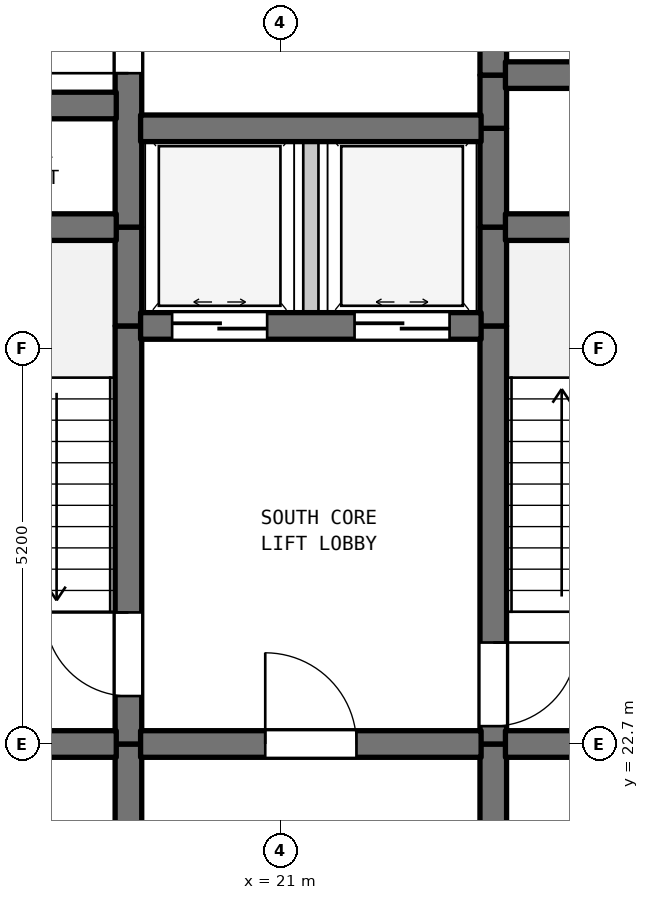
"""IFC4 building model, lengths in metres.
Left out: names, types, materials, properties, quantities, classifications, styles, units other than length and angle.
Written with IfcOpenShell. Run it as: python <this file> out.ifc"""

import sys

from ifc_helpers import new_model, si_unit, direction, frame, frame_2d, origin, place, context, subcontext, project, spatial, rectangle, extrude, element, fill, save


model = new_model("IFC4")
c1 = context("Model", 3, precision=1e-05, world=origin(), true_north=direction((0.0, 1.0)))
c2 = subcontext(c1, "Body", "Model", "MODEL_VIEW")
j1 = project(units=[si_unit("LENGTHUNIT", "METRE"), si_unit("PLANEANGLEUNIT", "RADIAN")], contexts=[c1])
p1 = place(None, origin())
s1 = spatial("IfcSite", under=j1, at=p1, CompositionType="ELEMENT")
p2 = place(p1, origin())
s2 = spatial("IfcBuilding", under=s1, at=p2, CompositionType="ELEMENT")
p3 = place(p2, frame((0.0, 0.0, 86.4)))
s3 = spatial("IfcBuildingStorey", under=s2, at=p3, CompositionType="ELEMENT", Elevation=86.4)
p4 = place(p3, frame((19.0, 19.5, 0.0), z_axis=(0.0, 0.0, 1.0), x_axis=(0.0, 1.0, 0.0)))
e1 = element("IfcWall", 1, at=p4, inside=s3, PredefinedType="SHEAR", context=c2, shape_type="SweptSolid", body=[
    extrude(rectangle(XDim=3.2, YDim=0.35, at=frame_2d((1.6, 0.0))), origin(), (0.0, 0.0, 1.0), 4.185),
])
p5 = place(p3, frame((19.0, 22.7, 0.0), z_axis=(0.0, 0.0, 1.0), x_axis=(0.0, 1.0, 0.0)))
e2 = element("IfcWall", 2, at=p5, inside=s3, PredefinedType="SHEAR", context=c2, shape_type="SweptSolid", body=[
    extrude(rectangle(XDim=5.5, YDim=0.35, at=frame_2d((2.75, 0.0))), origin(), (0.0, 0.0, 1.0), 4.185),
])
p6 = place(p5, frame((0.631, 0.0, 0.0)))
e3 = element("IfcOpeningElement", 3, at=p6, cuts=e2, PredefinedType="OPENING", context=c2, shape_type="SweptSolid", body=[
    extrude(rectangle(XDim=1.1, YDim=2.15, at=frame_2d((0.55, 1.075))), frame((0.0, 0.185, 0.0), z_axis=(0.0, -1.0, 0.0), x_axis=(1.0, 0.0, 0.0)), (0.0, 0.0, 1.0), 0.37),
])
p7 = place(p3, frame((19.0, 28.2, 0.0), z_axis=(0.0, 0.0, 1.0), x_axis=(0.0, 1.0, 0.0)))
e4 = element("IfcWall", 4, at=p7, inside=s3, PredefinedType="SHEAR", context=c2, shape_type="SweptSolid", body=[
    extrude(rectangle(XDim=1.3, YDim=0.35, at=frame_2d((0.65, 0.0))), origin(), (0.0, 0.0, 1.0), 4.185),
])
p8 = place(p3, frame((19.0, 29.5, 0.0), z_axis=(0.0, 0.0, 1.0), x_axis=(0.0, 1.0, 0.0)))
e5 = element("IfcWall", 5, at=p8, inside=s3, PredefinedType="SHEAR", context=c2, shape_type="SweptSolid", body=[
    extrude(rectangle(XDim=5.5, YDim=0.35, at=frame_2d((2.75, 0.0))), origin(), (0.0, 0.0, 1.0), 4.185),
])
p9 = place(p8, frame((2.025, 0.0, 0.0)))
e6 = element("IfcOpeningElement", 6, at=p9, cuts=e5, PredefinedType="OPENING", context=c2, shape_type="SweptSolid", body=[
    extrude(rectangle(XDim=1.1, YDim=2.15, at=frame_2d((0.55, 1.075))), frame((0.0, 0.185, 0.0), z_axis=(0.0, -1.0, 0.0), x_axis=(1.0, 0.0, 0.0)), (0.0, 0.0, 1.0), 0.37),
])
p10 = place(p3, frame((21.4, 28.2, 0.0), z_axis=(0.0, 0.0, 1.0), x_axis=(0.0, 1.0, 0.0)))
e7 = element("IfcWall", 7, at=p10, inside=s3, PredefinedType="STANDARD", context=c2, shape_type="SweptSolid", body=[
    extrude(rectangle(XDim=2.6, YDim=0.2, at=frame_2d((1.3, 0.0))), origin(), (0.0, 0.0, 1.0), 4.185),
])
p11 = place(p3, frame((23.8, 19.5, 0.0), z_axis=(0.0, 0.0, 1.0), x_axis=(0.0, 1.0, 0.0)))
e8 = element("IfcWall", 8, at=p11, inside=s3, PredefinedType="SHEAR", context=c2, shape_type="SweptSolid", body=[
    extrude(rectangle(XDim=3.2, YDim=0.35, at=frame_2d((1.6, 0.0))), origin(), (0.0, 0.0, 1.0), 4.185),
])
p12 = place(p3, frame((23.8, 22.7, 0.0), z_axis=(0.0, 0.0, 1.0), x_axis=(0.0, 1.0, 0.0)))
e9 = element("IfcWall", 9, at=p12, inside=s3, PredefinedType="SHEAR", context=c2, shape_type="SweptSolid", body=[
    extrude(rectangle(XDim=5.5, YDim=0.35, at=frame_2d((2.75, 0.0))), origin(), (0.0, 0.0, 1.0), 4.185),
])
p13 = place(p12, frame((0.235, 0.0, 0.0)))
e10 = element("IfcOpeningElement", 10, at=p13, cuts=e9, PredefinedType="OPENING", context=c2, shape_type="SweptSolid", body=[
    extrude(rectangle(XDim=1.1, YDim=2.15, at=frame_2d((0.55, 1.075))), frame((0.0, 0.185, 0.0), z_axis=(0.0, -1.0, 0.0), x_axis=(1.0, 0.0, 0.0)), (0.0, 0.0, 1.0), 0.37),
])
for number, where, z_axis, x_axis in (
    (11, (23.8, 28.2, 0.0), (0.0, 0.0, 1.0), (0.0, 1.0, 0.0)),
    (12, (23.8, 29.5, 0.0), (0.0, 0.0, 1.0), (0.0, 1.0, 0.0)),
):
    element("IfcWall", number, at=place(p3, frame(where, z_axis=z_axis, x_axis=x_axis)), inside=s3, PredefinedType="SHEAR", context=c2, shape_type="SweptSolid", body=[
        extrude(rectangle(XDim=1.3, YDim=0.35, at=frame_2d((0.65, 0.0))), origin(), (0.0, 0.0, 1.0), 4.185),
    ])
p14 = place(p3, frame((23.8, 30.8, 0.0), z_axis=(0.0, 0.0, 1.0), x_axis=(0.0, 1.0, 0.0)))
e13 = element("IfcWall", 13, at=p14, inside=s3, PredefinedType="SHEAR", context=c2, shape_type="SweptSolid", body=[
    extrude(rectangle(XDim=0.7, YDim=0.35, at=frame_2d((0.35, 0.0))), origin(), (0.0, 0.0, 1.0), 4.185),
])
p15 = place(p3, frame((23.8, 31.5, 0.0), z_axis=(0.0, 0.0, 1.0), x_axis=(0.0, 1.0, 0.0)))
e14 = element("IfcWall", 14, at=p15, inside=s3, PredefinedType="SHEAR", context=c2, shape_type="SweptSolid", body=[
    extrude(rectangle(XDim=3.5, YDim=0.35, at=frame_2d((1.75, 0.0))), origin(), (0.0, 0.0, 1.0), 4.185),
])
p16 = place(p15, frame((1.127, 0.0, 0.0)))
e15 = element("IfcOpeningElement", 15, at=p16, cuts=e14, PredefinedType="OPENING", context=c2, shape_type="SweptSolid", body=[
    extrude(rectangle(XDim=1.1, YDim=2.15, at=frame_2d((0.55, 1.075))), frame((0.0, 0.185, 0.0), z_axis=(0.0, -1.0, 0.0), x_axis=(1.0, 0.0, 0.0)), (0.0, 0.0, 1.0), 0.37),
])
p17 = place(p3, frame((15.16, 22.7, 0.0), z_axis=(0.0, 0.0, 1.0), x_axis=(1.0, 0.0, 0.0)))
e16 = element("IfcWall", 16, at=p17, inside=s3, PredefinedType="SHEAR", context=c2, shape_type="SweptSolid", body=[
    extrude(rectangle(XDim=3.68, YDim=0.35, at=frame_2d((1.84, 0.0))), origin(), (0.0, 0.0, 1.0), 4.185),
])
p18 = place(p3, frame((19.16, 22.7, 0.0), z_axis=(0.0, 0.0, 1.0), x_axis=(1.0, 0.0, 0.0)))
e17 = element("IfcWall", 17, at=p18, inside=s3, PredefinedType="SHEAR", context=c2, shape_type="SweptSolid", body=[
    extrude(rectangle(XDim=4.48, YDim=0.35, at=frame_2d((2.24, 0.0))), origin(), (0.0, 0.0, 1.0), 4.185),
])
p19 = place(p18, frame((1.64, 0.0, 0.0)))
e18 = element("IfcOpeningElement", 18, at=p19, cuts=e17, PredefinedType="OPENING", context=c2, shape_type="SweptSolid", body=[
    extrude(rectangle(XDim=1.2, YDim=2.2, at=frame_2d((0.6, 1.1))), frame((0.0, 0.185, 0.0), z_axis=(0.0, -1.0, 0.0), x_axis=(1.0, 0.0, 0.0)), (0.0, 0.0, 1.0), 0.37),
])
p20 = place(p3, frame((23.96, 22.7, 0.0), z_axis=(0.0, 0.0, 1.0), x_axis=(1.0, 0.0, 0.0)))
e19 = element("IfcWall", 19, at=p20, inside=s3, PredefinedType="SHEAR", context=c2, shape_type="SweptSolid", body=[
    extrude(rectangle(XDim=3.18, YDim=0.35, at=frame_2d((1.59, 0.0))), origin(), (0.0, 0.0, 1.0), 4.185),
])
p21 = place(p3, frame((19.16, 28.2, 0.0), z_axis=(0.0, 0.0, 1.0), x_axis=(1.0, 0.0, 0.0)))
e20 = element("IfcWall", 20, at=p21, inside=s3, PredefinedType="SHEAR", context=c2, shape_type="SweptSolid", body=[
    extrude(rectangle(XDim=4.48, YDim=0.35, at=frame_2d((2.24, 0.0))), origin(), (0.0, 0.0, 1.0), 4.185),
])
p22 = place(p21, frame((0.415, 0.0, 0.0)))
e21 = element("IfcOpeningElement", 21, at=p22, cuts=e20, PredefinedType="OPENING", context=c2, shape_type="SweptSolid", body=[
    extrude(rectangle(XDim=1.25, YDim=2.2, at=frame_2d((0.625, 1.1))), frame((0.0, 0.185, 0.0), z_axis=(0.0, -1.0, 0.0), x_axis=(1.0, 0.0, 0.0)), (0.0, 0.0, 1.0), 0.37),
])
p23 = place(p21, frame((2.815, 0.0, 0.0)))
e22 = element("IfcOpeningElement", 22, at=p23, cuts=e20, PredefinedType="OPENING", context=c2, shape_type="SweptSolid", body=[
    extrude(rectangle(XDim=1.25, YDim=2.2, at=frame_2d((0.625, 1.1))), frame((0.0, 0.185, 0.0), z_axis=(0.0, -1.0, 0.0), x_axis=(1.0, 0.0, 0.0)), (0.0, 0.0, 1.0), 0.37),
])
p24 = place(p3, frame((15.16, 29.5, 0.0), z_axis=(0.0, 0.0, 1.0), x_axis=(1.0, 0.0, 0.0)))
e23 = element("IfcWall", 23, at=p24, inside=s3, PredefinedType="SHEAR", context=c2, shape_type="SweptSolid", body=[
    extrude(rectangle(XDim=3.68, YDim=0.35, at=frame_2d((1.84, 0.0))), origin(), (0.0, 0.0, 1.0), 4.185),
])
p25 = place(p3, frame((23.96, 29.5, 0.0), z_axis=(0.0, 0.0, 1.0), x_axis=(1.0, 0.0, 0.0)))
e24 = element("IfcWall", 24, at=p25, inside=s3, PredefinedType="SHEAR", context=c2, shape_type="SweptSolid", body=[
    extrude(rectangle(XDim=3.18, YDim=0.35, at=frame_2d((1.59, 0.0))), origin(), (0.0, 0.0, 1.0), 4.185),
])
p26 = place(p3, frame((19.16, 30.8, 0.0), z_axis=(0.0, 0.0, 1.0), x_axis=(1.0, 0.0, 0.0)))
e25 = element("IfcWall", 25, at=p26, inside=s3, PredefinedType="SHEAR", context=c2, shape_type="SweptSolid", body=[
    extrude(rectangle(XDim=4.48, YDim=0.35, at=frame_2d((2.24, 0.0))), origin(), (0.0, 0.0, 1.0), 4.185),
])
p27 = place(p3, frame((15.16, 31.1, 0.0), z_axis=(0.0, 0.0, 1.0), x_axis=(1.0, 0.0, 0.0)))
e26 = element("IfcWall", 26, at=p27, inside=s3, PredefinedType="SHEAR", context=c2, shape_type="SweptSolid", body=[
    extrude(rectangle(XDim=3.68, YDim=0.35, at=frame_2d((1.84, 0.0))), origin(), (0.0, 0.0, 1.0), 4.185),
])
p28 = place(p3, frame((23.96, 31.5, 0.0), z_axis=(0.0, 0.0, 1.0), x_axis=(1.0, 0.0, 0.0)))
e27 = element("IfcWall", 27, at=p28, inside=s3, PredefinedType="SHEAR", context=c2, shape_type="SweptSolid", body=[
    extrude(rectangle(XDim=3.18, YDim=0.35, at=frame_2d((1.59, 0.0))), origin(), (0.0, 0.0, 1.0), 4.185),
])
p29 = place(p28, frame((1.094, 0.0, 0.0)))
e28 = element("IfcOpeningElement", 28, at=p29, cuts=e27, PredefinedType="OPENING", context=c2, shape_type="SweptSolid", body=[
    extrude(rectangle(XDim=0.85, YDim=2.1, at=frame_2d((0.425, 1.05))), frame((0.0, 0.185, 0.0), z_axis=(0.0, -1.0, 0.0), x_axis=(1.0, 0.0, 0.0)), (0.0, 0.0, 1.0), 0.37),
])
p30 = place(p6, origin())
e29 = element("IfcDoor", 29, at=p30, inside=s3, OperationType="SINGLE_SWING_RIGHT", PredefinedType="DOOR", context=c2, shape_type="SweptSolid", body=[
    extrude(rectangle(XDim=1.1, YDim=2.15, at=frame_2d((0.55, 1.075))), frame((0.0, 0.025, 0.0), z_axis=(0.0, -1.0, 0.0), x_axis=(1.0, 0.0, 0.0)), (0.0, 0.0, 1.0), 0.05),
])
fill(e3, e29)
p31 = place(p9, origin())
e30 = element("IfcDoor", 30, at=p31, inside=s3, OperationType="SINGLE_SWING_LEFT", PredefinedType="DOOR", context=c2, shape_type="SweptSolid", body=[
    extrude(rectangle(XDim=1.1, YDim=2.15, at=frame_2d((0.55, 1.075))), frame((0.0, 0.025, 0.0), z_axis=(0.0, -1.0, 0.0), x_axis=(1.0, 0.0, 0.0)), (0.0, 0.0, 1.0), 0.05),
])
fill(e6, e30)
p32 = place(p13, frame((1.1, 0.0, 0.0), z_axis=(0.0, 0.0, 1.0), x_axis=(-1.0, 0.0, 0.0)))
e31 = element("IfcDoor", 31, at=p32, inside=s3, OperationType="SINGLE_SWING_RIGHT", PredefinedType="DOOR", context=c2, shape_type="SweptSolid", body=[
    extrude(rectangle(XDim=1.1, YDim=2.15, at=frame_2d((0.55, 1.075))), frame((0.0, 0.025, 0.0), z_axis=(0.0, -1.0, 0.0), x_axis=(1.0, 0.0, 0.0)), (0.0, 0.0, 1.0), 0.05),
])
fill(e10, e31)
p33 = place(p19, origin())
e32 = element("IfcDoor", 32, at=p33, inside=s3, OperationType="SINGLE_SWING_LEFT", PredefinedType="DOOR", context=c2, shape_type="SweptSolid", body=[
    extrude(rectangle(XDim=1.2, YDim=2.2, at=frame_2d((0.6, 1.1))), frame((0.0, 0.025, 0.0), z_axis=(0.0, -1.0, 0.0), x_axis=(1.0, 0.0, 0.0)), (0.0, 0.0, 1.0), 0.05),
])
fill(e18, e32)
p34 = place(p22, origin())
e33 = element("IfcDoor", 33, at=p34, inside=s3, OperationType="DOUBLE_DOOR_SLIDING", PredefinedType="DOOR", context=c2, shape_type="SweptSolid", body=[
    extrude(rectangle(XDim=1.25, YDim=2.2, at=frame_2d((0.625, 1.1))), frame((0.0, 0.025, 0.0), z_axis=(0.0, -1.0, 0.0), x_axis=(1.0, 0.0, 0.0)), (0.0, 0.0, 1.0), 0.05),
])
fill(e21, e33)
p35 = place(p23, origin())
e34 = element("IfcDoor", 34, at=p35, inside=s3, OperationType="DOUBLE_DOOR_SLIDING", PredefinedType="DOOR", context=c2, shape_type="SweptSolid", body=[
    extrude(rectangle(XDim=1.25, YDim=2.2, at=frame_2d((0.625, 1.1))), frame((0.0, 0.025, 0.0), z_axis=(0.0, -1.0, 0.0), x_axis=(1.0, 0.0, 0.0)), (0.0, 0.0, 1.0), 0.05),
])
fill(e22, e34)
save(model, sys.argv[1])
